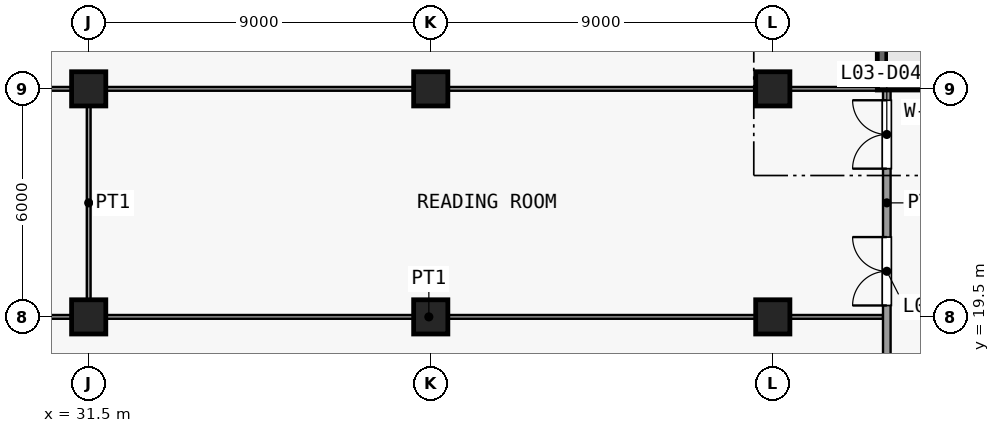
"""IFC4 building model, lengths in metres.
Left out: names, types, materials, properties, quantities, classifications, styles, units other than length and angle.
Written with IfcOpenShell. Run it as: python <this file> out.ifc"""

import sys

from ifc_helpers import new_model, si_unit, direction, frame, frame_2d, origin, origin_2d, place, context, subcontext, project, spatial, rectangle, extrude, element, fill, save


model = new_model("IFC4")
c1 = context("Model", 3, precision=1e-05, world=origin(), true_north=direction((0.0, 1.0)))
c2 = subcontext(c1, "Body", "Model", "MODEL_VIEW")
j1 = project(units=[si_unit("LENGTHUNIT", "METRE"), si_unit("PLANEANGLEUNIT", "RADIAN")], contexts=[c1])
p1 = place(None, origin())
s1 = spatial("IfcSite", under=j1, at=p1, CompositionType="ELEMENT")
p2 = place(p1, origin())
s2 = spatial("IfcBuilding", under=s1, at=p2, CompositionType="ELEMENT")
p3 = place(p2, frame((0.0, 0.0, 18.5)))
s3 = spatial("IfcBuildingStorey", under=s2, at=p3, CompositionType="ELEMENT", Elevation=18.5)
for number, where, z_axis, x_axis in (
    (1, (31.5, 19.5, 0.0), (0.0, 0.0, 1.0), (1.0, 0.0, 0.0)),
    (2, (31.5, 25.5, 0.0), (0.0, 0.0, 1.0), (1.0, 0.0, 0.0)),
    (3, (40.5, 19.5, 0.0), (0.0, 0.0, 1.0), (1.0, 0.0, 0.0)),
    (4, (40.5, 25.5, 0.0), (0.0, 0.0, 1.0), (1.0, 0.0, 0.0)),
    (5, (49.5, 19.5, 0.0), (0.0, 0.0, 1.0), (1.0, 0.0, 0.0)),
    (6, (49.5, 25.5, 0.0), (0.0, 0.0, 1.0), (1.0, 0.0, 0.0)),
):
    element("IfcColumn", number, at=place(p3, frame(where, z_axis=z_axis, x_axis=x_axis)), inside=s3, PredefinedType="COLUMN", context=c2, shape_type="SweptSolid", body=[
        extrude(rectangle(XDim=0.9, YDim=0.9, at=origin_2d()), origin(), (0.0, 0.0, 1.0), 5.0),
    ])
p4 = place(p3, frame((52.375, 25.72, 0.0), z_axis=(0.0, 0.0, 1.0), x_axis=(0.0, 1.0, 0.0)))
e7 = element("IfcWall", 7, at=p4, inside=s3, PredefinedType="SHEAR", context=c2, shape_type="SweptSolid", body=[
    extrude(rectangle(XDim=1.35, YDim=0.25, at=frame_2d((0.675, 0.0))), origin(), (0.0, 0.0, 1.0), 4.65),
])
p5 = place(p3, frame((52.25, 25.595, 0.0), z_axis=(0.0, 0.0, 1.0), x_axis=(1.0, 0.0, 0.0)))
e8 = element("IfcWall", 8, at=p5, inside=s3, PredefinedType="SHEAR", context=c2, shape_type="SweptSolid", body=[
    extrude(rectangle(XDim=3.35, YDim=0.25, at=frame_2d((1.675, 0.0))), origin(), (0.0, 0.0, 1.0), 4.65),
])
p6 = place(p3, frame((28.5, 19.5, 0.0), z_axis=(0.0, 0.0, 1.0), x_axis=(1.0, 0.0, 0.0)))
e9 = element("IfcWall", 9, at=p6, inside=s3, PredefinedType="PARTITIONING", context=c2, shape_type="SweptSolid", body=[
    extrude(rectangle(XDim=23.9, YDim=0.1, at=frame_2d((11.95, 0.0))), origin(), (0.0, 0.0, 1.0), 4.65),
])
p7 = place(p3, frame((-25.9, 25.5, 0.0), z_axis=(0.0, 0.0, 1.0), x_axis=(1.0, 0.0, 0.0)))
e10 = element("IfcWall", 10, at=p7, inside=s3, PredefinedType="PARTITIONING", context=c2, shape_type="SweptSolid", body=[
    extrude(rectangle(XDim=78.15, YDim=0.1, at=frame_2d((39.075, 0.0))), origin(), (0.0, 0.0, 1.0), 4.65),
])
p8 = place(p3, frame((31.5, 19.55, 0.0), z_axis=(0.0, 0.0, 1.0), x_axis=(0.0, 1.0, 0.0)))
e11 = element("IfcWall", 11, at=p8, inside=s3, PredefinedType="PARTITIONING", context=c2, shape_type="SweptSolid", body=[
    extrude(rectangle(XDim=5.9, YDim=0.1, at=frame_2d((2.95, 0.0))), origin(), (0.0, 0.0, 1.0), 4.65),
])
p9 = place(p3, frame((52.5, 16.6, 0.0), z_axis=(0.0, 0.0, 1.0), x_axis=(0.0, 1.0, 0.0)))
e12 = element("IfcWall", 12, at=p9, inside=s3, PredefinedType="PARTITIONING", context=c2, shape_type="SweptSolid", body=[
    extrude(rectangle(XDim=8.87, YDim=0.2, at=frame_2d((4.435, 0.0))), origin(), (0.0, 0.0, 1.0), 4.65),
])
p10 = place(p9, frame((0.9, 0.0, 0.0)))
e13 = element("IfcOpeningElement", 13, at=p10, cuts=e12, PredefinedType="OPENING", context=c2, shape_type="SweptSolid", body=[
    extrude(rectangle(XDim=1.0, YDim=2.1, at=frame_2d((0.5, 1.05))), frame((0.0, 0.11, 0.0), z_axis=(0.0, -1.0, 0.0), x_axis=(1.0, 0.0, 0.0)), (0.0, 0.0, 1.0), 0.22),
])
p11 = place(p9, frame((3.2, 0.0, 0.0)))
e14 = element("IfcOpeningElement", 14, at=p11, cuts=e12, PredefinedType="OPENING", context=c2, shape_type="SweptSolid", body=[
    extrude(rectangle(XDim=1.8, YDim=2.1, at=frame_2d((0.9, 1.05))), frame((0.0, 0.11, 0.0), z_axis=(0.0, -1.0, 0.0), x_axis=(1.0, 0.0, 0.0)), (0.0, 0.0, 1.0), 0.22),
])
p12 = place(p9, frame((6.8, 0.0, 0.0)))
e15 = element("IfcOpeningElement", 15, at=p12, cuts=e12, PredefinedType="OPENING", context=c2, shape_type="SweptSolid", body=[
    extrude(rectangle(XDim=1.8, YDim=2.1, at=frame_2d((0.9, 1.05))), frame((0.0, 0.11, 0.0), z_axis=(0.0, -1.0, 0.0), x_axis=(1.0, 0.0, 0.0)), (0.0, 0.0, 1.0), 0.22),
])
p13 = place(p11, origin())
e16 = element("IfcDoor", 16, at=p13, inside=s3, OperationType="DOUBLE_DOOR_SINGLE_SWING", PredefinedType="DOOR", context=c2, shape_type="SweptSolid", body=[
    extrude(rectangle(XDim=1.8, YDim=2.1, at=frame_2d((0.9, 1.05))), frame((0.0, 0.025, 0.0), z_axis=(0.0, -1.0, 0.0), x_axis=(1.0, 0.0, 0.0)), (0.0, 0.0, 1.0), 0.05),
])
fill(e14, e16)
p14 = place(p12, origin())
e17 = element("IfcDoor", 17, at=p14, inside=s3, OperationType="DOUBLE_DOOR_SINGLE_SWING", PredefinedType="DOOR", context=c2, shape_type="SweptSolid", body=[
    extrude(rectangle(XDim=1.8, YDim=2.1, at=frame_2d((0.9, 1.05))), frame((0.0, 0.025, 0.0), z_axis=(0.0, -1.0, 0.0), x_axis=(1.0, 0.0, 0.0)), (0.0, 0.0, 1.0), 0.05),
])
fill(e15, e17)
save(model, sys.argv[1])
